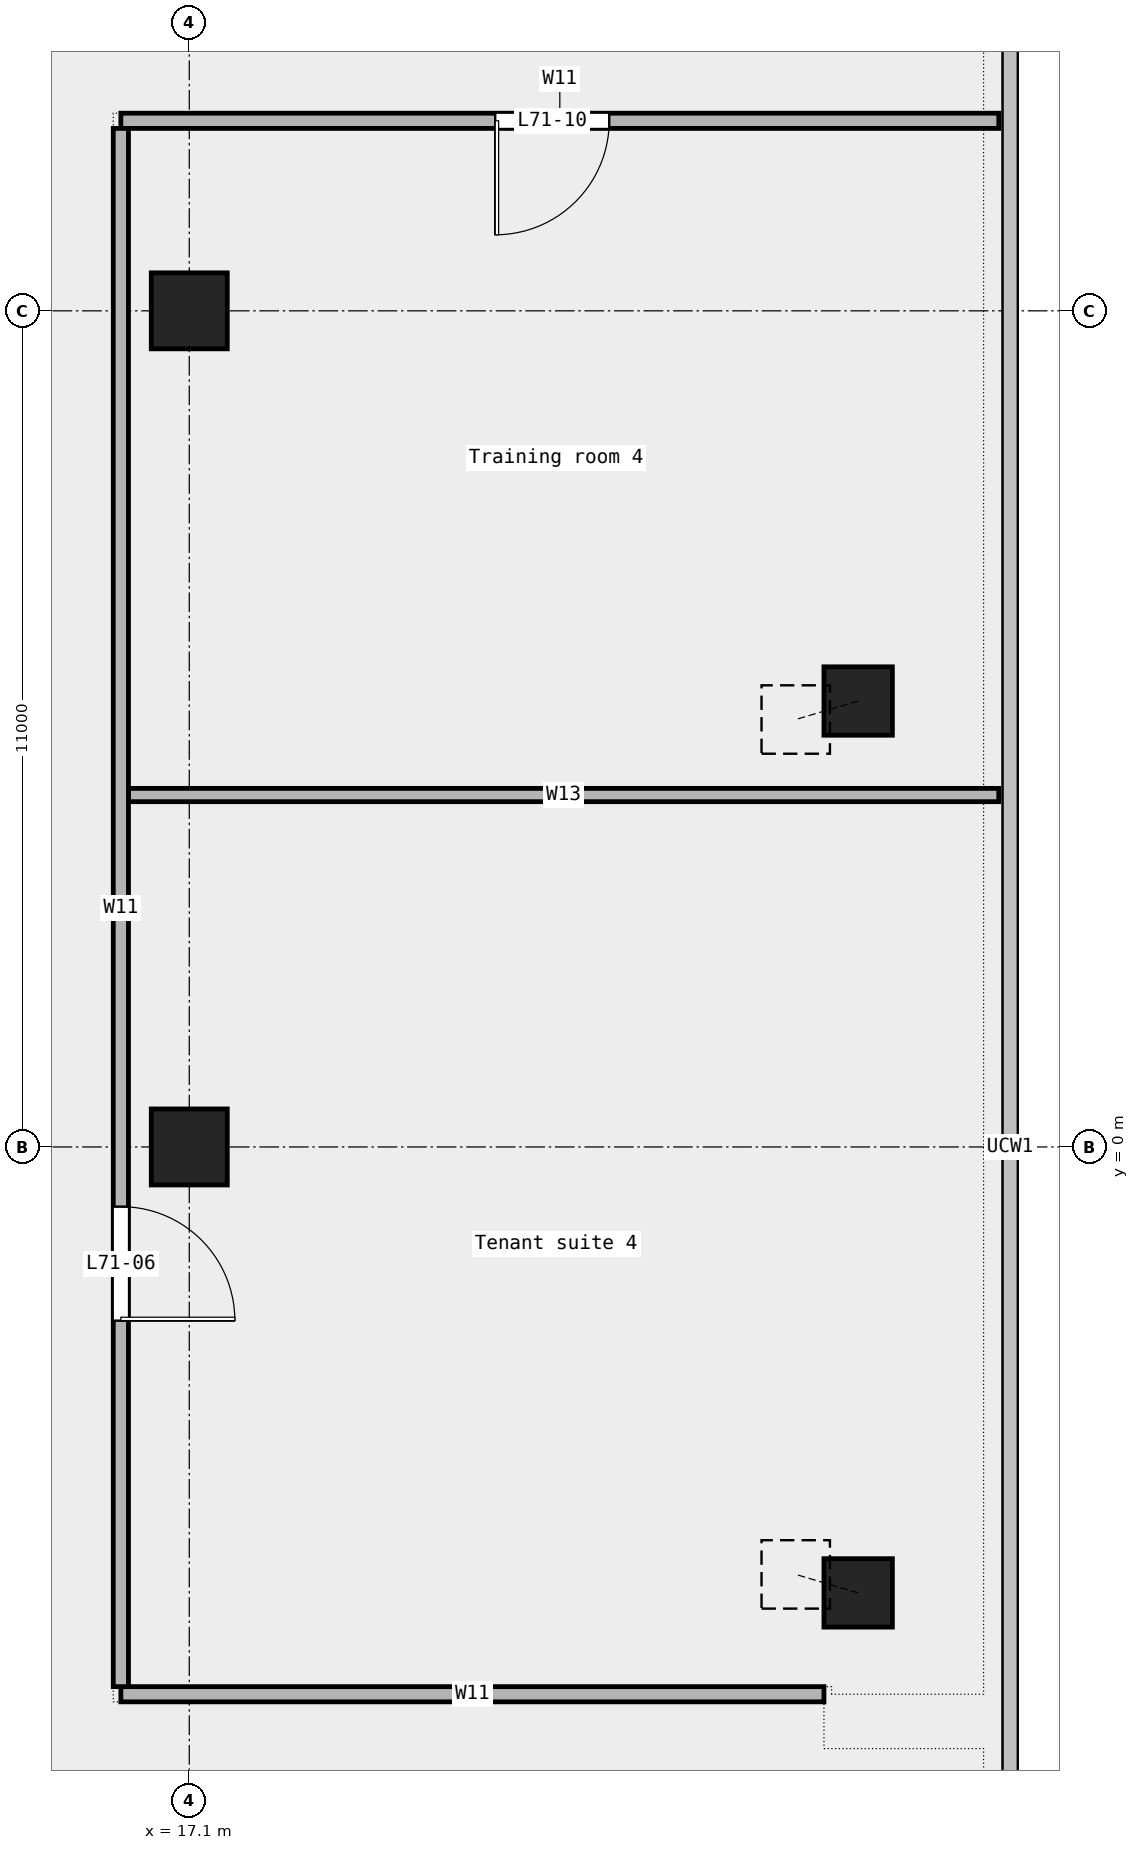
"""IFC4 building model, lengths in metres.
Left out: names, types, materials, properties, quantities, classifications, styles, units other than length and angle.
Written with IfcOpenShell. Run it as: python <this file> out.ifc"""

import sys

from ifc_helpers import new_model, si_unit, direction, frame, frame_2d, origin, origin_2d, place, context, subcontext, project, spatial, rectangle, extrude, element, fill, save


model = new_model("IFC4")
c1 = context("Model", 3, precision=1e-05, world=origin(), true_north=direction((0.0, 1.0)))
c2 = subcontext(c1, "Body", "Model", "MODEL_VIEW")
j1 = project(units=[si_unit("LENGTHUNIT", "METRE"), si_unit("PLANEANGLEUNIT", "RADIAN")], contexts=[c1])
p1 = place(None, origin())
s1 = spatial("IfcSite", under=j1, at=p1, CompositionType="ELEMENT")
p2 = place(p1, origin())
s2 = spatial("IfcBuilding", under=s1, at=p2, CompositionType="ELEMENT")
p3 = place(p2, frame((0.0, 0.0, 325.4)))
s3 = spatial("IfcBuildingStorey", under=s2, at=p3, CompositionType="ELEMENT", Elevation=325.4)
for number, where, z_axis, x_axis in (
    (1, (25.9, -5.867, 0.0), (-0.219, 0.065, 0.974), (-0.284, -0.959, 0.0)),
    (2, (25.9, 5.867, 0.0), (-0.219, -0.065, 0.974), (0.284, -0.959, 0.0)),
):
    element("IfcColumn", number, at=place(p3, frame(where, z_axis=z_axis, x_axis=x_axis)), inside=s3, PredefinedType="COLUMN", context=c2, shape_type="SweptSolid", body=[
        extrude(rectangle(XDim=0.9, YDim=0.9, at=origin_2d()), origin(), (0.0, 0.0, 1.0), 3.749),
    ])
for number, where, z_axis, x_axis in (
    (3, (17.1, 0.0, 0.0), (0.0, 0.0, 1.0), (1.0, 0.0, 0.0)),
    (4, (17.1, 11.0, 0.0), (0.0, 0.0, 1.0), (1.0, 0.0, 0.0)),
):
    element("IfcColumn", number, at=place(p3, frame(where, z_axis=z_axis, x_axis=x_axis)), inside=s3, PredefinedType="COLUMN", context=c2, shape_type="SweptSolid", body=[
        extrude(rectangle(XDim=1.0, YDim=1.0, at=origin_2d()), origin(), (0.0, 0.0, 1.0), 3.65),
    ])
p4 = place(p3, frame((16.2, -7.2, 0.0), z_axis=(0.0, 0.0, 1.0), x_axis=(1.0, 0.0, 0.0)))
e5 = element("IfcWall", 5, at=p4, inside=s3, PredefinedType="PARTITIONING", context=c2, shape_type="SweptSolid", body=[
    extrude(rectangle(XDim=9.25, YDim=0.2, at=frame_2d((4.625, 0.0))), origin(), (0.0, 0.0, 1.0), 3.65),
])
p5 = place(p3, frame((16.3, 4.63, 0.0), z_axis=(0.0, 0.0, 1.0), x_axis=(1.0, 0.0, 0.0)))
e6 = element("IfcWall", 6, at=p5, inside=s3, PredefinedType="PARTITIONING", context=c2, shape_type="SweptSolid", body=[
    extrude(rectangle(XDim=11.45, YDim=0.175, at=frame_2d((5.725, 0.0))), origin(), (0.0, 0.0, 1.0), 3.65),
])
p6 = place(p3, frame((16.2, 13.5, 0.0), z_axis=(0.0, 0.0, 1.0), x_axis=(1.0, 0.0, 0.0)))
e7 = element("IfcWall", 7, at=p6, inside=s3, PredefinedType="PARTITIONING", context=c2, shape_type="SweptSolid", body=[
    extrude(rectangle(XDim=11.55, YDim=0.2, at=frame_2d((5.775, 0.0))), origin(), (0.0, 0.0, 1.0), 3.65),
])
p7 = place(p6, frame((4.925, 0.0, 0.0)))
e8 = element("IfcOpeningElement", 8, at=p7, cuts=e7, PredefinedType="OPENING", context=c2, shape_type="SweptSolid", body=[
    extrude(rectangle(XDim=1.5, YDim=2.1, at=frame_2d((0.75, 1.05))), frame((0.0, 0.112, 0.0), z_axis=(0.0, -1.0, 0.0), x_axis=(1.0, 0.0, 0.0)), (0.0, 0.0, 1.0), 0.224),
])
p8 = place(p3, frame((16.2, -7.1, 0.0), z_axis=(0.0, 0.0, 1.0), x_axis=(0.0, 1.0, 0.0)))
e9 = element("IfcWall", 9, at=p8, inside=s3, PredefinedType="PARTITIONING", context=c2, shape_type="SweptSolid", body=[
    extrude(rectangle(XDim=20.5, YDim=0.2, at=frame_2d((10.25, 0.0))), origin(), (0.0, 0.0, 1.0), 3.65),
])
p9 = place(p8, frame((4.815, 0.0, 0.0)))
e10 = element("IfcOpeningElement", 10, at=p9, cuts=e9, PredefinedType="OPENING", context=c2, shape_type="SweptSolid", body=[
    extrude(rectangle(XDim=1.5, YDim=2.1, at=frame_2d((0.75, 1.05))), frame((0.0, 0.112, 0.0), z_axis=(0.0, -1.0, 0.0), x_axis=(1.0, 0.0, 0.0)), (0.0, 0.0, 1.0), 0.224),
])
p10 = place(p9, origin())
e11 = element("IfcDoor", 11, at=p10, inside=s3, OperationType="DOUBLE_DOOR_SINGLE_SWING", PredefinedType="DOOR", context=c2, shape_type="SweptSolid", body=[
    extrude(rectangle(XDim=1.5, YDim=2.1, at=frame_2d((0.75, 1.05))), frame((0.0, 0.025, 0.0), z_axis=(0.0, -1.0, 0.0), x_axis=(1.0, 0.0, 0.0)), (0.0, 0.0, 1.0), 0.05),
])
fill(e10, e11)
p11 = place(p7, origin())
e12 = element("IfcDoor", 12, at=p11, inside=s3, OperationType="DOUBLE_DOOR_SINGLE_SWING", PredefinedType="DOOR", context=c2, shape_type="SweptSolid", body=[
    extrude(rectangle(XDim=1.5, YDim=2.1, at=frame_2d((0.75, 1.05))), frame((0.0, 0.025, 0.0), z_axis=(0.0, -1.0, 0.0), x_axis=(1.0, 0.0, 0.0)), (0.0, 0.0, 1.0), 0.05),
])
fill(e8, e12)
save(model, sys.argv[1])
